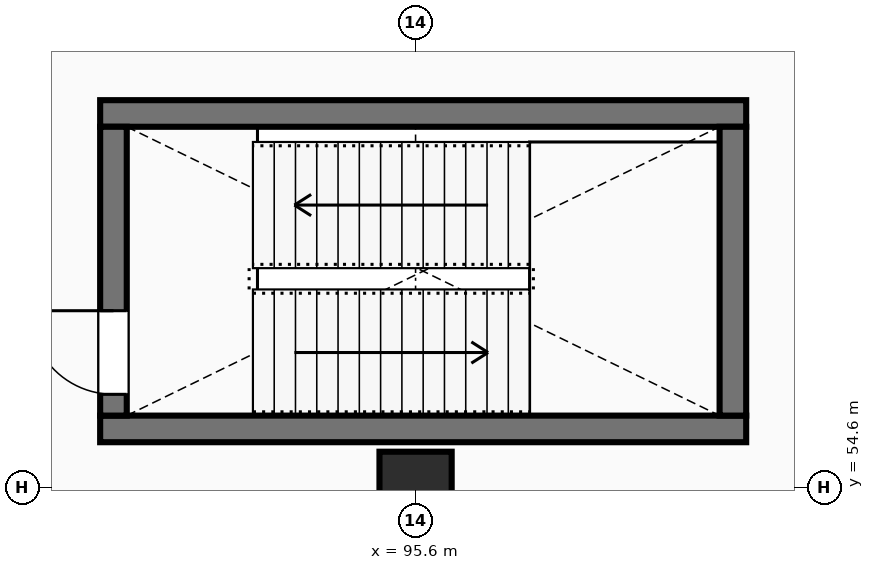
"""IFC4 building model, lengths in metres.
Left out: names, types, materials, properties, quantities, classifications, styles, units other than length and angle.
Written with IfcOpenShell. Run it as: python <this file> out.ifc"""

import sys

from ifc_helpers import new_model, si_unit, direction, frame, frame_2d, origin, origin_2d, place, context, subcontext, project, spatial, rectangle, extrude, element, fill, save


model = new_model("IFC4")
c1 = context("Model", 3, precision=1e-05, world=origin(), true_north=direction((0.0, 1.0)))
c2 = subcontext(c1, "Body", "Model", "MODEL_VIEW")
j1 = project(units=[si_unit("LENGTHUNIT", "METRE"), si_unit("PLANEANGLEUNIT", "RADIAN")], contexts=[c1])
p1 = place(None, origin())
s1 = spatial("IfcSite", under=j1, at=p1, CompositionType="ELEMENT")
p2 = place(p1, origin())
s2 = spatial("IfcBuilding", under=s1, at=p2, CompositionType="ELEMENT")
p3 = place(p2, frame((0.0, 0.0, -4.8)))
s3 = spatial("IfcBuildingStorey", under=s2, at=p3, CompositionType="ELEMENT", Elevation=-4.8)
p4 = place(p3, frame((95.6, 54.6, 0.0), z_axis=(0.0, 0.0, 1.0), x_axis=(1.0, 0.0, 0.0)))
e1 = element("IfcColumn", 1, at=p4, inside=s3, PredefinedType="COLUMN", context=c2, shape_type="SweptSolid", body=[
    extrude(rectangle(XDim=0.95, YDim=0.95, at=origin_2d()), origin(), (0.0, 0.0, 1.0), 4.8),
])
for number, where, z_axis, x_axis in (
    (2, (91.45, 55.375, 0.0), (0.0, 0.0, 1.0), (1.0, 0.0, 0.0)),
    (3, (99.95, 59.525, 0.0), (0.0, 0.0, 1.0), (-1.0, 0.0, 0.0)),
):
    element("IfcWall", number, at=place(p3, frame(where, z_axis=z_axis, x_axis=x_axis)), inside=s3, PredefinedType="SHEAR", context=c2, shape_type="SweptSolid", body=[
        extrude(rectangle(XDim=8.5, YDim=0.35, at=frame_2d((4.25, 0.0))), origin(), (0.0, 0.0, 1.0), 4.48),
    ])
p5 = place(p3, frame((91.625, 55.55, 0.0), z_axis=(0.0, 0.0, 1.0), x_axis=(0.0, 1.0, 0.0)))
e4 = element("IfcWall", 4, at=p5, inside=s3, PredefinedType="SHEAR", context=c2, shape_type="SweptSolid", body=[
    extrude(rectangle(XDim=3.8, YDim=0.35, at=frame_2d((1.9, 0.0))), origin(), (0.0, 0.0, 1.0), 4.48),
])
p6 = place(p5, frame((0.28, 0.0, 0.0)))
e5 = element("IfcOpeningElement", 5, at=p6, cuts=e4, PredefinedType="OPENING", context=c2, shape_type="SweptSolid", body=[
    extrude(rectangle(XDim=1.1, YDim=2.08, at=frame_2d((0.55, 1.04))), frame((0.0, 0.185, 0.0), z_axis=(0.0, -1.0, 0.0), x_axis=(1.0, 0.0, 0.0)), (0.0, 0.0, 1.0), 0.37),
])
p7 = place(p3, frame((99.775, 59.35, 0.0), z_axis=(0.0, 0.0, 1.0), x_axis=(0.0, -1.0, 0.0)))
e6 = element("IfcWall", 6, at=p7, inside=s3, PredefinedType="SHEAR", context=c2, shape_type="SweptSolid", body=[
    extrude(rectangle(XDim=3.8, YDim=0.35, at=frame_2d((1.9, 0.0))), origin(), (0.0, 0.0, 1.0), 4.48),
])
p8 = place(p6, origin())
e7 = element("IfcDoor", 7, at=p8, inside=s3, OperationType="SINGLE_SWING_RIGHT", PredefinedType="DOOR", context=c2, shape_type="SweptSolid", body=[
    extrude(rectangle(XDim=1.1, YDim=2.08, at=frame_2d((0.55, 1.04))), frame((0.0, 0.025, 0.0), z_axis=(0.0, -1.0, 0.0), x_axis=(1.0, 0.0, 0.0)), (0.0, 0.0, 1.0), 0.05),
])
fill(e5, e7)
save(model, sys.argv[1])
